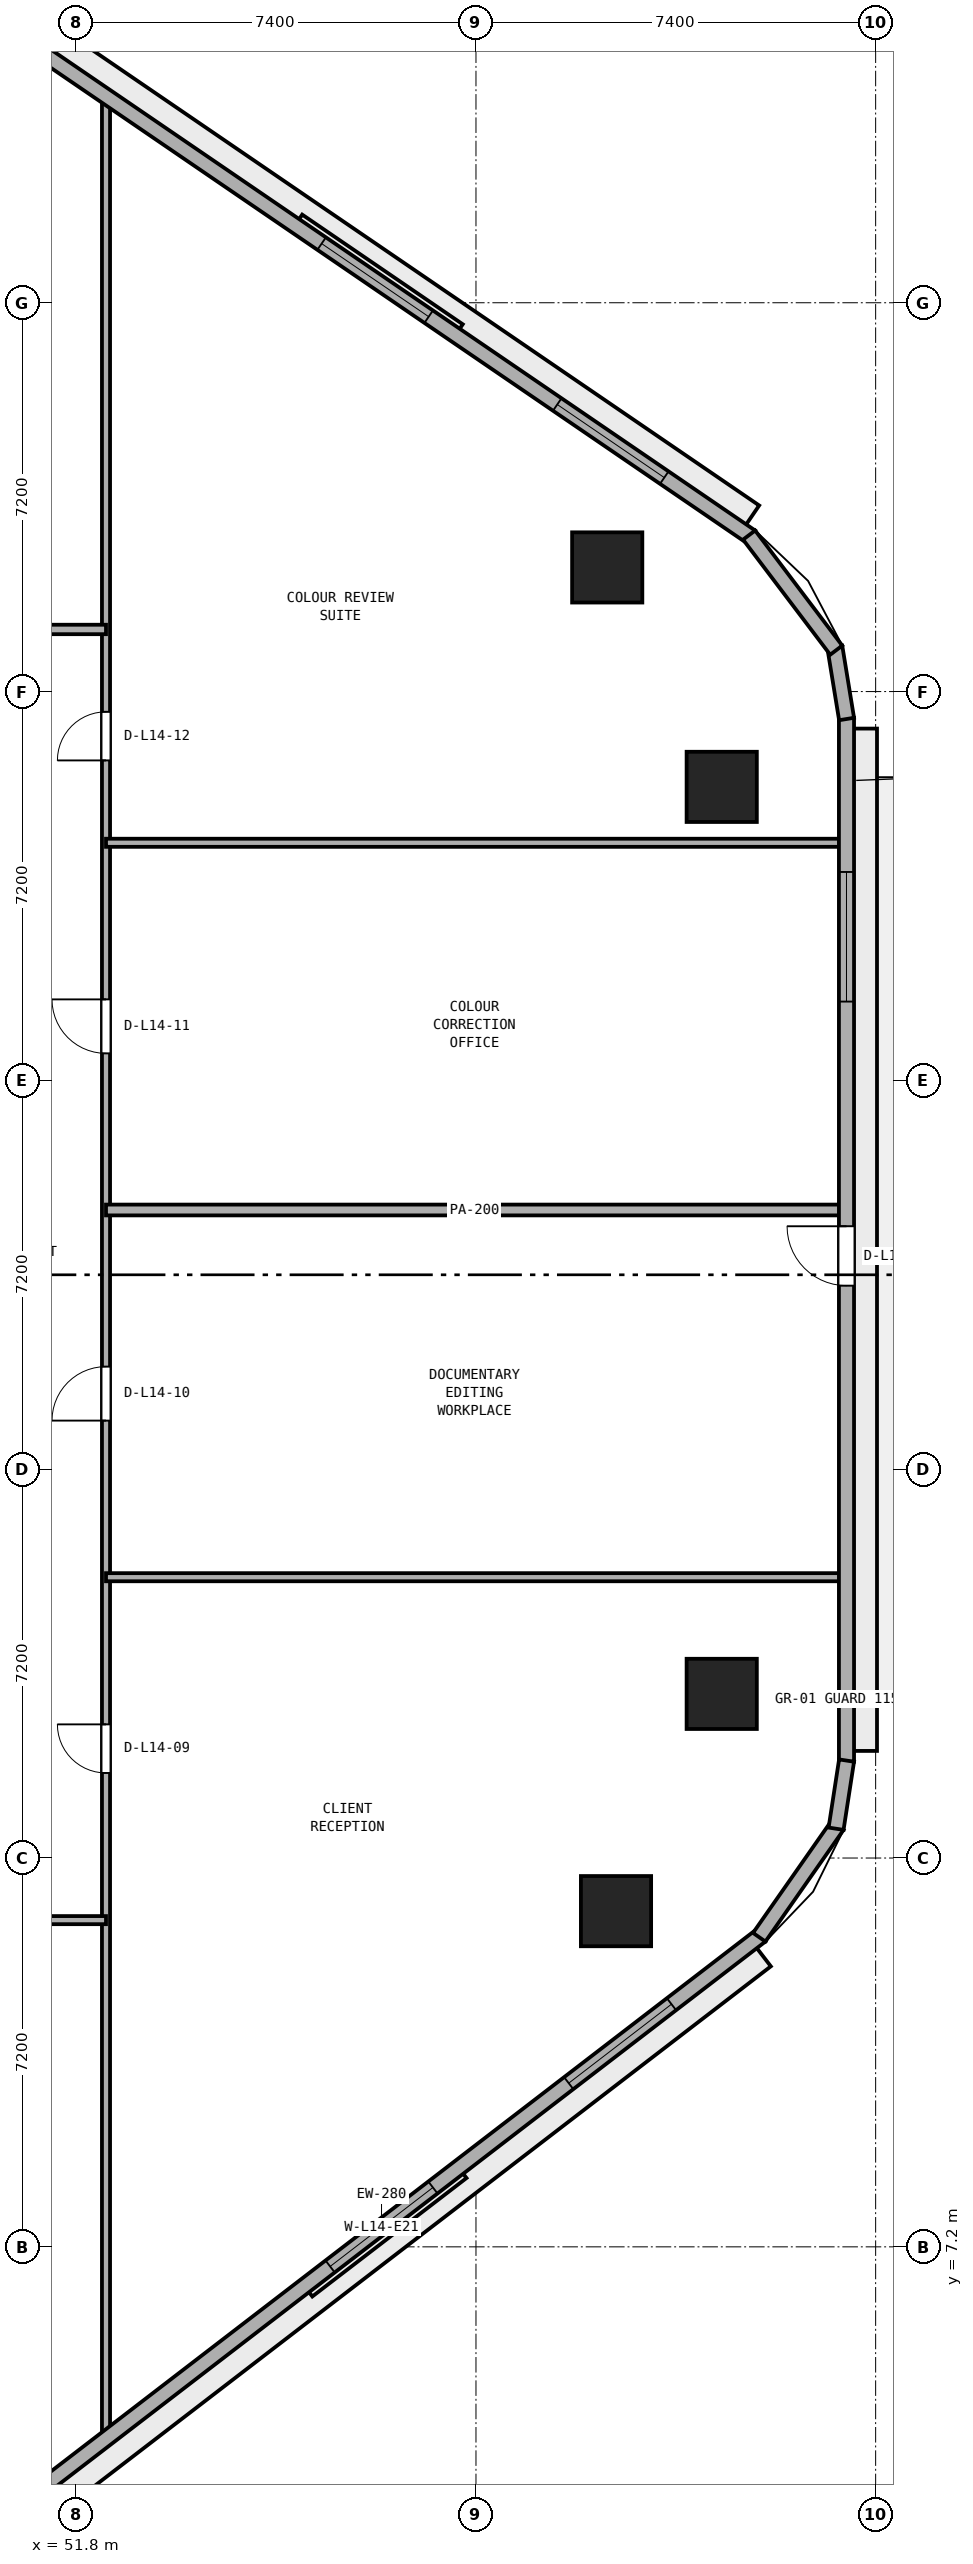
"""IFC4 building model, lengths in metres.
Left out: names, types, materials, properties, quantities, classifications, styles, units other than length and angle.
Written with IfcOpenShell. Run it as: python <this file> out.ifc"""

import sys

from ifc_helpers import new_model, si_unit, direction, frame, frame_2d, origin, origin_2d, place, context, subcontext, project, spatial, rectangle, extrude, element, fill, save


model = new_model("IFC4")
c1 = context("Model", 3, precision=1e-05, world=origin(), true_north=direction((0.0, 1.0)))
c2 = subcontext(c1, "Body", "Model", "MODEL_VIEW")
j1 = project(units=[si_unit("LENGTHUNIT", "METRE"), si_unit("PLANEANGLEUNIT", "RADIAN")], contexts=[c1])
p1 = place(None, origin())
s1 = spatial("IfcSite", under=j1, at=p1, CompositionType="ELEMENT")
p2 = place(p1, origin())
s2 = spatial("IfcBuilding", under=s1, at=p2, CompositionType="ELEMENT")
p3 = place(p2, frame((0.0, 0.0, 59.2)))
s3 = spatial("IfcBuildingStorey", under=s2, at=p3, CompositionType="ELEMENT", Elevation=59.2)
for number, where, z_axis, x_axis in (
    (1, (61.793, 13.416, 0.0), (0.0, 0.0, 1.0), (1.0, 0.0, 0.0)),
    (2, (63.75, 17.44, 0.0), (0.0, 0.0, 1.0), (1.0, 0.0, 0.0)),
    (3, (63.75, 34.235, 0.0), (0.0, 0.0, 1.0), (1.0, 0.0, 0.0)),
    (4, (61.63, 38.299, 0.0), (0.0, 0.0, 1.0), (1.0, 0.0, 0.0)),
):
    element("IfcColumn", number, at=place(p3, frame(where, z_axis=z_axis, x_axis=x_axis)), inside=s3, PredefinedType="COLUMN", context=c2, shape_type="SweptSolid", body=[
        extrude(rectangle(XDim=1.3, YDim=1.3, at=origin_2d()), origin(), (0.0, 0.0, 1.0), 3.8),
    ])
p4 = place(p3, frame((52.35, 3.611, 0.0), z_axis=(0.0, 0.0, 1.0), x_axis=(0.0, 1.0, 0.0)))
e5 = element("IfcWall", 5, at=p4, inside=s3, PredefinedType="PARTITIONING", context=c2, shape_type="SweptSolid", body=[
    extrude(rectangle(XDim=43.441, YDim=0.15, at=frame_2d((21.72, 0.0))), origin(), (0.0, 0.0, 1.0), 3.525),
])
p5 = place(p4, frame((12.364, 0.0, 0.0)))
e6 = element("IfcOpeningElement", 6, at=p5, cuts=e5, PredefinedType="OPENING", context=c2, shape_type="SweptSolid", body=[
    extrude(rectangle(XDim=0.9, YDim=2.1, at=frame_2d((0.45, 1.05))), frame((0.0, 0.085, 0.0), z_axis=(0.0, -1.0, 0.0), x_axis=(1.0, 0.0, 0.0)), (0.0, 0.0, 1.0), 0.17),
])
p6 = place(p4, frame((18.889, 0.0, 0.0)))
e7 = element("IfcOpeningElement", 7, at=p6, cuts=e5, PredefinedType="OPENING", context=c2, shape_type="SweptSolid", body=[
    extrude(rectangle(XDim=1.0, YDim=2.12, at=frame_2d((0.5, 1.06))), frame((0.0, 0.085, 0.0), z_axis=(0.0, -1.0, 0.0), x_axis=(1.0, 0.0, 0.0)), (0.0, 0.0, 1.0), 0.17),
])
p7 = place(p4, frame((25.689, 0.0, 0.0)))
e8 = element("IfcOpeningElement", 8, at=p7, cuts=e5, PredefinedType="OPENING", context=c2, shape_type="SweptSolid", body=[
    extrude(rectangle(XDim=1.0, YDim=2.12, at=frame_2d((0.5, 1.06))), frame((0.0, 0.085, 0.0), z_axis=(0.0, -1.0, 0.0), x_axis=(1.0, 0.0, 0.0)), (0.0, 0.0, 1.0), 0.17),
])
p8 = place(p4, frame((31.114, 0.0, 0.0)))
e9 = element("IfcOpeningElement", 9, at=p8, cuts=e5, PredefinedType="OPENING", context=c2, shape_type="SweptSolid", body=[
    extrude(rectangle(XDim=0.9, YDim=2.1, at=frame_2d((0.45, 1.05))), frame((0.0, 0.085, 0.0), z_axis=(0.0, -1.0, 0.0), x_axis=(1.0, 0.0, 0.0)), (0.0, 0.0, 1.0), 0.17),
])
p9 = place(p3, frame((21.65, 13.25, 0.0), z_axis=(0.0, 0.0, 1.0), x_axis=(1.0, 0.0, 0.0)))
e10 = element("IfcWall", 10, at=p9, inside=s3, PredefinedType="PARTITIONING", context=c2, shape_type="SweptSolid", body=[
    extrude(rectangle(XDim=30.7, YDim=0.15, at=frame_2d((15.35, 0.0))), origin(), (0.0, 0.0, 1.0), 3.525),
])
p10 = place(p9, frame((3.695, 0.0, 0.0)))
e11 = element("IfcOpeningElement", 11, at=p10, cuts=e10, PredefinedType="OPENING", context=c2, shape_type="SweptSolid", body=[
    extrude(rectangle(XDim=0.9, YDim=2.1, at=frame_2d((0.45, 1.05))), frame((0.0, 0.085, 0.0), z_axis=(0.0, -1.0, 0.0), x_axis=(1.0, 0.0, 0.0)), (0.0, 0.0, 1.0), 0.17),
])
p11 = place(p9, frame((11.95, 0.0, 0.0)))
e12 = element("IfcOpeningElement", 12, at=p11, cuts=e10, PredefinedType="OPENING", context=c2, shape_type="SweptSolid", body=[
    extrude(rectangle(XDim=0.9, YDim=2.1, at=frame_2d((0.45, 1.05))), frame((0.0, 0.085, 0.0), z_axis=(0.0, -1.0, 0.0), x_axis=(1.0, 0.0, 0.0)), (0.0, 0.0, 1.0), 0.17),
])
p12 = place(p9, frame((20.45, 0.0, 0.0)))
e13 = element("IfcOpeningElement", 13, at=p12, cuts=e10, PredefinedType="OPENING", context=c2, shape_type="SweptSolid", body=[
    extrude(rectangle(XDim=0.9, YDim=2.1, at=frame_2d((0.45, 1.05))), frame((0.0, 0.085, 0.0), z_axis=(0.0, -1.0, 0.0), x_axis=(1.0, 0.0, 0.0)), (0.0, 0.0, 1.0), 0.17),
])
p13 = place(p9, frame((27.305, 0.0, 0.0)))
e14 = element("IfcOpeningElement", 14, at=p13, cuts=e10, PredefinedType="OPENING", context=c2, shape_type="SweptSolid", body=[
    extrude(rectangle(XDim=0.9, YDim=2.1, at=frame_2d((0.45, 1.05))), frame((0.0, 0.085, 0.0), z_axis=(0.0, -1.0, 0.0), x_axis=(1.0, 0.0, 0.0)), (0.0, 0.0, 1.0), 0.17),
])
p14 = place(p3, frame((52.35, 19.6, 0.0), z_axis=(0.0, 0.0, 1.0), x_axis=(1.0, 0.0, 0.0)))
e15 = element("IfcWall", 15, at=p14, inside=s3, PredefinedType="PARTITIONING", context=c2, shape_type="SweptSolid", body=[
    extrude(rectangle(XDim=13.645, YDim=0.15, at=frame_2d((6.823, 0.0))), origin(), (0.0, 0.0, 1.0), 3.525),
])
p15 = place(p3, frame((52.35, 26.4, 0.0), z_axis=(0.0, 0.0, 1.0), x_axis=(1.0, 0.0, 0.0)))
e16 = element("IfcWall", 16, at=p15, inside=s3, PredefinedType="PARTITIONING", context=c2, shape_type="SweptSolid", body=[
    extrude(rectangle(XDim=13.645, YDim=0.2, at=frame_2d((6.823, 0.0))), origin(), (0.0, 0.0, 1.0), 3.525),
])
p16 = place(p3, frame((52.35, 33.2, 0.0), z_axis=(0.0, 0.0, 1.0), x_axis=(1.0, 0.0, 0.0)))
e17 = element("IfcWall", 17, at=p16, inside=s3, PredefinedType="PARTITIONING", context=c2, shape_type="SweptSolid", body=[
    extrude(rectangle(XDim=13.645, YDim=0.15, at=frame_2d((6.823, 0.0))), origin(), (0.0, 0.0, 1.0), 3.525),
])
p17 = place(p3, frame((21.65, 37.15, 0.0), z_axis=(0.0, 0.0, 1.0), x_axis=(1.0, 0.0, 0.0)))
e18 = element("IfcWall", 18, at=p17, inside=s3, PredefinedType="PARTITIONING", context=c2, shape_type="SweptSolid", body=[
    extrude(rectangle(XDim=30.7, YDim=0.175, at=frame_2d((15.35, 0.0))), origin(), (0.0, 0.0, 1.0), 3.525),
])
p18 = place(p17, frame((3.795, 0.0, 0.0)))
e19 = element("IfcOpeningElement", 19, at=p18, cuts=e18, PredefinedType="OPENING", context=c2, shape_type="SweptSolid", body=[
    extrude(rectangle(XDim=1.0, YDim=2.12, at=frame_2d((0.5, 1.06))), frame((0.0, 0.097, 0.0), z_axis=(0.0, -1.0, 0.0), x_axis=(1.0, 0.0, 0.0)), (0.0, 0.0, 1.0), 0.195),
])
p19 = place(p17, frame((18.905, 0.0, 0.0)))
e20 = element("IfcOpeningElement", 20, at=p19, cuts=e18, PredefinedType="OPENING", context=c2, shape_type="SweptSolid", body=[
    extrude(rectangle(XDim=1.0, YDim=2.12, at=frame_2d((0.5, 1.06))), frame((0.0, 0.097, 0.0), z_axis=(0.0, -1.0, 0.0), x_axis=(1.0, 0.0, 0.0)), (0.0, 0.0, 1.0), 0.195),
])
p20 = place(p3, frame((50.429, 2.172, 0.0), z_axis=(0.0, 0.0, 1.0), x_axis=(0.792937466367, 0.609303023488, 0.0)))
e21 = element("IfcWall", 21, at=p20, inside=s3, PredefinedType="STANDARD", context=c2, shape_type="SweptSolid", body=[
    extrude(rectangle(XDim=17.713, YDim=0.28, at=frame_2d((8.856, 0.0))), origin(), (0.0, 0.0, 1.0), 3.525),
])
p21 = place(p20, frame((7.656, 0.0, 0.9)))
e22 = element("IfcOpeningElement", 22, at=p21, cuts=e21, PredefinedType="OPENING", context=c2, shape_type="SweptSolid", body=[
    extrude(rectangle(XDim=2.4, YDim=1.75, at=frame_2d((1.2, 0.875))), frame((0.0, 0.15, 0.0), z_axis=(0.0, -1.0, 0.0), x_axis=(1.0, 0.0, 0.0)), (0.0, 0.0, 1.0), 0.3),
])
p22 = place(p20, frame((13.227, 0.0, 0.9)))
e23 = element("IfcOpeningElement", 23, at=p22, cuts=e21, PredefinedType="OPENING", context=c2, shape_type="SweptSolid", body=[
    extrude(rectangle(XDim=2.4, YDim=1.75, at=frame_2d((1.2, 0.875))), frame((0.0, 0.15, 0.0), z_axis=(0.0, -1.0, 0.0), x_axis=(1.0, 0.0, 0.0)), (0.0, 0.0, 1.0), 0.3),
])
p23 = place(p3, frame((66.06, 16.183, 0.0), z_axis=(0.0, 0.0, 1.0), x_axis=(0.0, 1.0, 0.0)))
e24 = element("IfcWall", 24, at=p23, inside=s3, PredefinedType="STANDARD", context=c2, shape_type="SweptSolid", body=[
    extrude(rectangle(XDim=19.331, YDim=0.28, at=frame_2d((9.666, 0.0))), origin(), (0.0, 0.0, 1.0), 3.525),
])
p24 = place(p23, frame((8.815, 0.0, 0.0)))
e25 = element("IfcOpeningElement", 25, at=p24, cuts=e24, PredefinedType="OPENING", context=c2, shape_type="SweptSolid", body=[
    extrude(rectangle(XDim=1.1, YDim=2.2, at=frame_2d((0.55, 1.1))), frame((0.0, 0.15, 0.0), z_axis=(0.0, -1.0, 0.0), x_axis=(1.0, 0.0, 0.0)), (0.0, 0.0, 1.0), 0.3),
])
p25 = place(p23, frame((14.076, 0.0, 0.9)))
e26 = element("IfcOpeningElement", 26, at=p25, cuts=e24, PredefinedType="OPENING", context=c2, shape_type="SweptSolid", body=[
    extrude(rectangle(XDim=2.4, YDim=1.75, at=frame_2d((1.2, 0.875))), frame((0.0, 0.15, 0.0), z_axis=(0.0, -1.0, 0.0), x_axis=(1.0, 0.0, 0.0)), (0.0, 0.0, 1.0), 0.3),
])
p26 = place(p3, frame((64.29, 38.867, 0.0), z_axis=(0.0, 0.0, 1.0), x_axis=(-0.825755550159, 0.564028165416, 0.0)))
e27 = element("IfcWall", 27, at=p26, inside=s3, PredefinedType="STANDARD", context=c2, shape_type="SweptSolid", body=[
    extrude(rectangle(XDim=16.848, YDim=0.28, at=frame_2d((8.424, 0.0))), origin(), (0.0, 0.0, 1.0), 3.525),
])
p27 = place(p26, frame((1.941, 0.0, 0.9)))
e28 = element("IfcOpeningElement", 28, at=p27, cuts=e27, PredefinedType="OPENING", context=c2, shape_type="SweptSolid", body=[
    extrude(rectangle(XDim=2.4, YDim=1.75, at=frame_2d((1.2, 0.875))), frame((0.0, 0.15, 0.0), z_axis=(0.0, -1.0, 0.0), x_axis=(1.0, 0.0, 0.0)), (0.0, 0.0, 1.0), 0.3),
])
p28 = place(p26, frame((7.224, 0.0, 0.9)))
e29 = element("IfcOpeningElement", 29, at=p28, cuts=e27, PredefinedType="OPENING", context=c2, shape_type="SweptSolid", body=[
    extrude(rectangle(XDim=2.4, YDim=1.75, at=frame_2d((1.2, 0.875))), frame((0.0, 0.15, 0.0), z_axis=(0.0, -1.0, 0.0), x_axis=(1.0, 0.0, 0.0)), (0.0, 0.0, 1.0), 0.3),
])
p29 = place(p3, frame((64.444, 12.933, 0.0), z_axis=(0.0, 0.0, 1.0), x_axis=(0.573176686443, 0.819431806875, 0.0)))
e30 = element("IfcWall", 30, at=p29, inside=s3, PredefinedType="STANDARD", context=c2, shape_type="SweptSolid", body=[
    extrude(rectangle(XDim=2.524, YDim=0.28, at=frame_2d((1.262, 0.0))), origin(), (0.0, 0.0, 1.0), 3.525),
])
p30 = place(p3, frame((65.867, 14.943, 0.0), z_axis=(0.0, 0.0, 1.0), x_axis=(0.152014078361, 0.988378328364, 0.0)))
e31 = element("IfcWall", 31, at=p30, inside=s3, PredefinedType="STANDARD", context=c2, shape_type="SweptSolid", body=[
    extrude(rectangle(XDim=1.277, YDim=0.28, at=frame_2d((0.638, 0.0))), origin(), (0.0, 0.0, 1.0), 3.525),
])
p31 = place(p3, frame((66.062, 35.492, 0.0), z_axis=(0.0, 0.0, 1.0), x_axis=(-0.161182073582, 0.986924687682, 0.0)))
e32 = element("IfcWall", 32, at=p31, inside=s3, PredefinedType="STANDARD", context=c2, shape_type="SweptSolid", body=[
    extrude(rectangle(XDim=1.354, YDim=0.28, at=frame_2d((0.677, 0.0))), origin(), (0.0, 0.0, 1.0), 3.525),
])
p32 = place(p3, frame((65.87, 36.767, 0.0), z_axis=(0.0, 0.0, 1.0), x_axis=(-0.603370463754, 0.797461023166, 0.0)))
e33 = element("IfcWall", 33, at=p32, inside=s3, PredefinedType="STANDARD", context=c2, shape_type="SweptSolid", body=[
    extrude(rectangle(XDim=2.673, YDim=0.28, at=frame_2d((1.336, 0.0))), origin(), (0.0, 0.0, 1.0), 3.525),
])
p33 = place(p5, origin())
e34 = element("IfcDoor", 34, at=p33, inside=s3, OperationType="SINGLE_SWING_RIGHT", PredefinedType="DOOR", context=c2, shape_type="SweptSolid", body=[
    extrude(rectangle(XDim=0.9, YDim=2.1, at=frame_2d((0.45, 1.05))), frame((0.0, 0.025, 0.0), z_axis=(0.0, -1.0, 0.0), x_axis=(1.0, 0.0, 0.0)), (0.0, 0.0, 1.0), 0.05),
])
fill(e6, e34)
p34 = place(p6, origin())
e35 = element("IfcDoor", 35, at=p34, inside=s3, OperationType="SINGLE_SWING_LEFT", PredefinedType="DOOR", context=c2, shape_type="SweptSolid", body=[
    extrude(rectangle(XDim=1.0, YDim=2.12, at=frame_2d((0.5, 1.06))), frame((0.0, 0.025, 0.0), z_axis=(0.0, -1.0, 0.0), x_axis=(1.0, 0.0, 0.0)), (0.0, 0.0, 1.0), 0.05),
])
fill(e7, e35)
p35 = place(p7, origin())
e36 = element("IfcDoor", 36, at=p35, inside=s3, OperationType="SINGLE_SWING_RIGHT", PredefinedType="DOOR", context=c2, shape_type="SweptSolid", body=[
    extrude(rectangle(XDim=1.0, YDim=2.12, at=frame_2d((0.5, 1.06))), frame((0.0, 0.025, 0.0), z_axis=(0.0, -1.0, 0.0), x_axis=(1.0, 0.0, 0.0)), (0.0, 0.0, 1.0), 0.05),
])
fill(e8, e36)
p36 = place(p8, origin())
e37 = element("IfcDoor", 37, at=p36, inside=s3, OperationType="SINGLE_SWING_LEFT", PredefinedType="DOOR", context=c2, shape_type="SweptSolid", body=[
    extrude(rectangle(XDim=0.9, YDim=2.1, at=frame_2d((0.45, 1.05))), frame((0.0, 0.025, 0.0), z_axis=(0.0, -1.0, 0.0), x_axis=(1.0, 0.0, 0.0)), (0.0, 0.0, 1.0), 0.05),
])
fill(e9, e37)
p37 = place(p21, origin())
e38 = element("IfcWindow", 38, at=p37, inside=s3, PartitioningType="SINGLE_PANEL", PredefinedType="WINDOW", context=c2, shape_type="SweptSolid", body=[
    extrude(rectangle(XDim=2.4, YDim=1.75, at=frame_2d((1.2, 0.875))), frame((0.0, 0.03, 0.0), z_axis=(0.0, -1.0, 0.0), x_axis=(1.0, 0.0, 0.0)), (0.0, 0.0, 1.0), 0.06),
])
fill(e22, e38)
p38 = place(p22, origin())
e39 = element("IfcWindow", 39, at=p38, inside=s3, PartitioningType="SINGLE_PANEL", PredefinedType="WINDOW", context=c2, shape_type="SweptSolid", body=[
    extrude(rectangle(XDim=2.4, YDim=1.75, at=frame_2d((1.2, 0.875))), frame((0.0, 0.03, 0.0), z_axis=(0.0, -1.0, 0.0), x_axis=(1.0, 0.0, 0.0)), (0.0, 0.0, 1.0), 0.06),
])
fill(e23, e39)
p39 = place(p24, origin())
e40 = element("IfcDoor", 40, at=p39, inside=s3, OperationType="SINGLE_SWING_RIGHT", PredefinedType="DOOR", context=c2, shape_type="SweptSolid", body=[
    extrude(rectangle(XDim=1.1, YDim=2.2, at=frame_2d((0.55, 1.1))), frame((0.0, 0.025, 0.0), z_axis=(0.0, -1.0, 0.0), x_axis=(1.0, 0.0, 0.0)), (0.0, 0.0, 1.0), 0.05),
])
fill(e25, e40)
p40 = place(p25, origin())
e41 = element("IfcWindow", 41, at=p40, inside=s3, PartitioningType="SINGLE_PANEL", PredefinedType="WINDOW", context=c2, shape_type="SweptSolid", body=[
    extrude(rectangle(XDim=2.4, YDim=1.75, at=frame_2d((1.2, 0.875))), frame((0.0, 0.03, 0.0), z_axis=(0.0, -1.0, 0.0), x_axis=(1.0, 0.0, 0.0)), (0.0, 0.0, 1.0), 0.06),
])
fill(e26, e41)
p41 = place(p27, origin())
e42 = element("IfcWindow", 42, at=p41, inside=s3, PartitioningType="SINGLE_PANEL", PredefinedType="WINDOW", context=c2, shape_type="SweptSolid", body=[
    extrude(rectangle(XDim=2.4, YDim=1.75, at=frame_2d((1.2, 0.875))), frame((0.0, 0.03, 0.0), z_axis=(0.0, -1.0, 0.0), x_axis=(1.0, 0.0, 0.0)), (0.0, 0.0, 1.0), 0.06),
])
fill(e28, e42)
p42 = place(p28, origin())
e43 = element("IfcWindow", 43, at=p42, inside=s3, PartitioningType="SINGLE_PANEL", PredefinedType="WINDOW", context=c2, shape_type="SweptSolid", body=[
    extrude(rectangle(XDim=2.4, YDim=1.75, at=frame_2d((1.2, 0.875))), frame((0.0, 0.03, 0.0), z_axis=(0.0, -1.0, 0.0), x_axis=(1.0, 0.0, 0.0)), (0.0, 0.0, 1.0), 0.06),
])
fill(e29, e43)
save(model, sys.argv[1])
